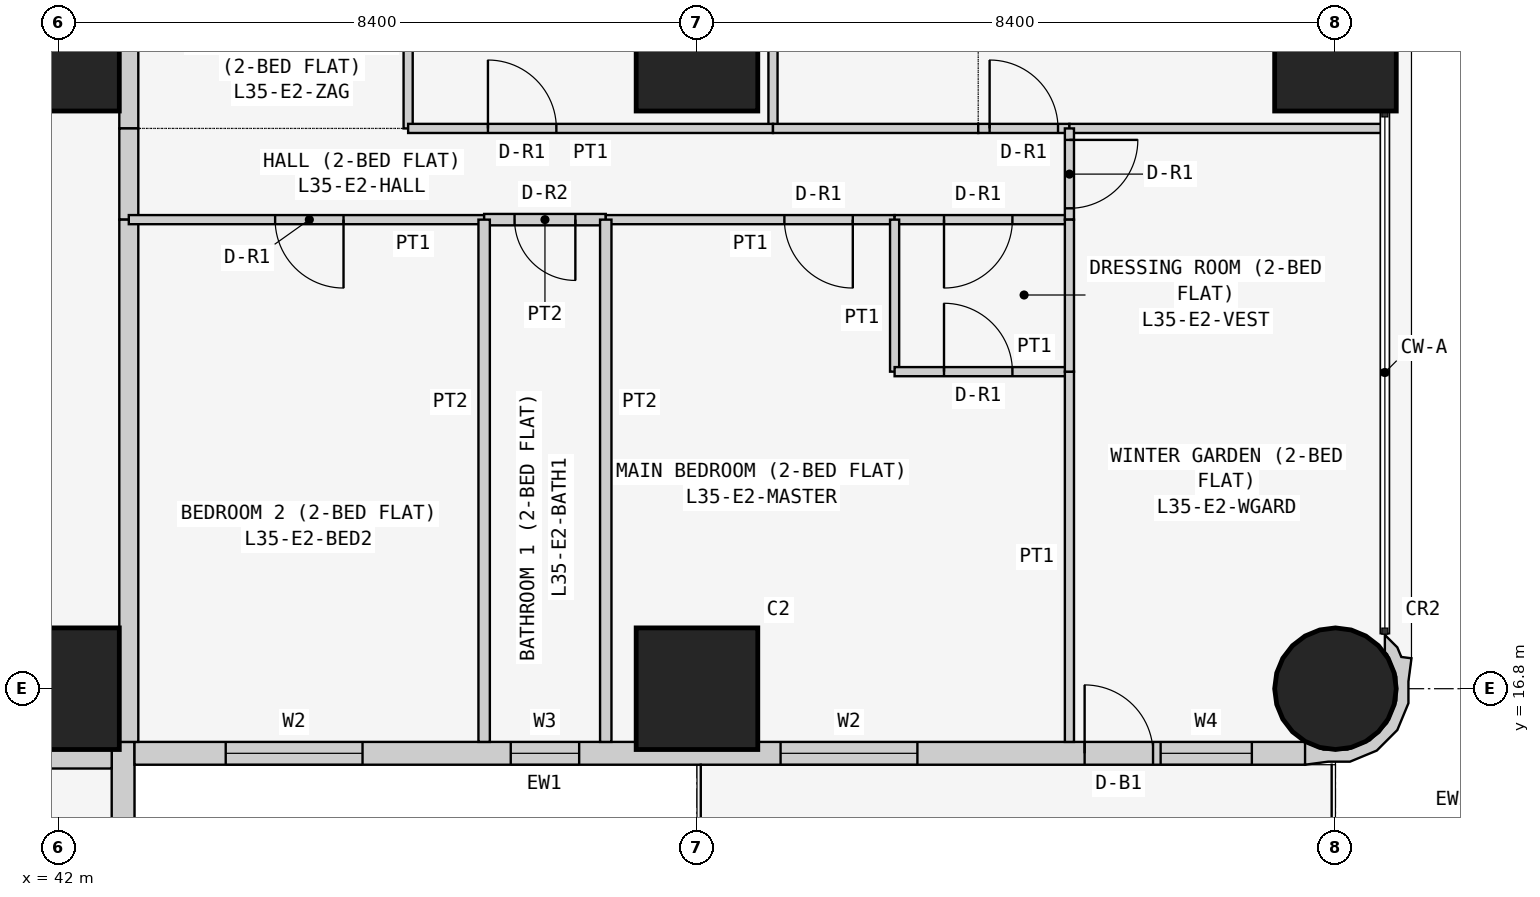
"""IFC4 building model, lengths in metres.
Left out: names, types, materials, properties, quantities, classifications, styles, units other than length and angle.
Written with IfcOpenShell. Run it as: python <this file> out.ifc"""

import sys

from ifc_helpers import new_model, si_unit, direction, frame, frame_2d, origin, origin_2d, place, context, subcontext, project, spatial, polyline, rectangle, circle, outline, extrude, element, fill, save


model = new_model("IFC4")
c1 = context("Model", 3, precision=1e-05, world=origin(), true_north=direction((0.0, 1.0)))
c2 = subcontext(c1, "Body", "Model", "MODEL_VIEW")
j1 = project(units=[si_unit("LENGTHUNIT", "METRE"), si_unit("PLANEANGLEUNIT", "RADIAN")], contexts=[c1])
p1 = place(None, origin())
s1 = spatial("IfcSite", under=j1, at=p1, CompositionType="ELEMENT")
p2 = place(p1, origin())
s2 = spatial("IfcBuilding", under=s1, at=p2, CompositionType="ELEMENT")
p3 = place(p2, frame((0.0, 0.0, 137.7)))
s3 = spatial("IfcBuildingStorey", under=s2, at=p3, CompositionType="ELEMENT", Elevation=137.7)
for number, where, z_axis, x_axis in (
    (1, (42.0, 16.8, 0.0), (0.0, 0.0, 1.0), (1.0, 0.0, 0.0)),
    (2, (42.0, 25.2, 0.0), (0.0, 0.0, 1.0), (1.0, 0.0, 0.0)),
    (3, (50.4, 16.8, 0.0), (0.0, 0.0, 1.0), (1.0, 0.0, 0.0)),
    (4, (50.4, 25.2, 0.0), (0.0, 0.0, 1.0), (1.0, 0.0, 0.0)),
):
    element("IfcColumn", number, at=place(p3, frame(where, z_axis=z_axis, x_axis=x_axis)), inside=s3, PredefinedType="COLUMN", context=c2, shape_type="SweptSolid", body=[
        extrude(rectangle(XDim=1.6, YDim=1.6, at=origin_2d()), origin(), (0.0, 0.0, 1.0), 3.6),
    ])
p4 = place(p3, frame((58.8, 16.8, 0.0), z_axis=(0.0, 0.0, 1.0), x_axis=(1.0, 0.0, 0.0)))
e5 = element("IfcColumn", 5, at=p4, inside=s3, PredefinedType="COLUMN", context=c2, shape_type="SweptSolid", body=[
    extrude(circle(Radius=0.8, at=origin_2d()), origin(), (0.0, 0.0, 1.0), 3.6),
])
p5 = place(p3, frame((58.8, 25.2, 0.0), z_axis=(0.0, 0.0, 1.0), x_axis=(1.0, 0.0, 0.0)))
e6 = element("IfcColumn", 6, at=p5, inside=s3, PredefinedType="COLUMN", context=c2, shape_type="SweptSolid", body=[
    extrude(rectangle(XDim=1.6, YDim=1.6, at=origin_2d()), origin(), (0.0, 0.0, 1.0), 3.6),
])
p6 = place(p3, frame((42.85, 8.8, 0.0), z_axis=(0.0, 0.0, 1.0), x_axis=(0.0, 1.0, 0.0)))
e7 = element("IfcWall", 7, at=p6, inside=s3, PredefinedType="SOLIDWALL", context=c2, shape_type="SweptSolid", body=[
    extrude(rectangle(XDim=7.3, YDim=0.3, at=frame_2d((3.65, 0.0))), origin(), (0.0, 0.0, 1.0), 3.45),
])
p7 = place(p6, frame((3.1, 0.0, 0.9)))
e8 = element("IfcOpeningElement", 8, at=p7, cuts=e7, PredefinedType="OPENING", context=c2, shape_type="SweptSolid", body=[
    extrude(rectangle(XDim=2.4, YDim=1.5, at=frame_2d((1.2, 0.75))), frame((0.0, 0.16, 0.0), z_axis=(0.0, -1.0, 0.0), x_axis=(1.0, 0.0, 0.0)), (0.0, 0.0, 1.0), 0.32),
])
p8 = place(p6, frame((0.75, 0.0, 0.9)))
e9 = element("IfcOpeningElement", 9, at=p8, cuts=e7, PredefinedType="OPENING", context=c2, shape_type="SweptSolid", body=[
    extrude(rectangle(XDim=1.2, YDim=1.5, at=frame_2d((0.6, 0.75))), frame((0.0, 0.16, 0.0), z_axis=(0.0, -1.0, 0.0), x_axis=(1.0, 0.0, 0.0)), (0.0, 0.0, 1.0), 0.32),
])
p9 = place(p3, frame((43.0, 15.95, 0.0), z_axis=(0.0, 0.0, 1.0), x_axis=(1.0, 0.0, 0.0)))
e10 = element("IfcWall", 10, at=p9, inside=s3, PredefinedType="SOLIDWALL", context=c2, shape_type="SweptSolid", body=[
    extrude(rectangle(XDim=15.4, YDim=0.3, at=frame_2d((7.7, 0.0))), origin(), (0.0, 0.0, 1.0), 3.45),
])
p10 = place(p9, frame((1.2, 0.0, 0.9)))
e11 = element("IfcOpeningElement", 11, at=p10, cuts=e10, PredefinedType="OPENING", context=c2, shape_type="SweptSolid", body=[
    extrude(rectangle(XDim=1.8, YDim=1.5, at=frame_2d((0.9, 0.75))), frame((0.0, 0.16, 0.0), z_axis=(0.0, -1.0, 0.0), x_axis=(1.0, 0.0, 0.0)), (0.0, 0.0, 1.0), 0.32),
])
p11 = place(p9, frame((4.95, 0.0, 1.5)))
e12 = element("IfcOpeningElement", 12, at=p11, cuts=e10, PredefinedType="OPENING", context=c2, shape_type="SweptSolid", body=[
    extrude(rectangle(XDim=0.9, YDim=0.7, at=frame_2d((0.45, 0.35))), frame((0.0, 0.16, 0.0), z_axis=(0.0, -1.0, 0.0), x_axis=(1.0, 0.0, 0.0)), (0.0, 0.0, 1.0), 0.32),
])
p12 = place(p9, frame((8.5, 0.0, 0.9)))
e13 = element("IfcOpeningElement", 13, at=p12, cuts=e10, PredefinedType="OPENING", context=c2, shape_type="SweptSolid", body=[
    extrude(rectangle(XDim=1.8, YDim=1.5, at=frame_2d((0.9, 0.75))), frame((0.0, 0.16, 0.0), z_axis=(0.0, -1.0, 0.0), x_axis=(1.0, 0.0, 0.0)), (0.0, 0.0, 1.0), 0.32),
])
p13 = place(p9, frame((12.5, 0.0, 0.0)))
e14 = element("IfcOpeningElement", 14, at=p13, cuts=e10, PredefinedType="OPENING", context=c2, shape_type="SweptSolid", body=[
    extrude(rectangle(XDim=0.9, YDim=2.4, at=frame_2d((0.45, 1.2))), frame((0.0, 0.16, 0.0), z_axis=(0.0, -1.0, 0.0), x_axis=(1.0, 0.0, 0.0)), (0.0, 0.0, 1.0), 0.32),
])
p14 = place(p9, frame((13.5, 0.0, 0.9)))
e15 = element("IfcOpeningElement", 15, at=p14, cuts=e10, PredefinedType="OPENING", context=c2, shape_type="SweptSolid", body=[
    extrude(rectangle(XDim=1.2, YDim=1.5, at=frame_2d((0.6, 0.75))), frame((0.0, 0.16, 0.0), z_axis=(0.0, -1.0, 0.0), x_axis=(1.0, 0.0, 0.0)), (0.0, 0.0, 1.0), 0.32),
])
p15 = place(p3, frame((58.473, 15.983, 0.0), z_axis=(0.0, 0.0, 1.0), x_axis=(0.93923434088, -0.343276641956, 0.0)))
e16 = element("IfcWall", 16, at=p15, inside=s3, PredefinedType="SOLIDWALL", context=c2, shape_type="SweptSolid", body=[
    extrude(outline(polyline([(0.828, 1.599), (0.697, 1.569), (0.604, 1.67), (0.394, 1.767), (0.471, 1.556), (0.508, 1.539), (0.724, 1.304), (0.834, 1.005), (0.82, 0.686), (0.686, 0.397), (0.451, 0.182), (0.152, 0.073), (-0.116, 0.084), (-0.127, 0.078), (-0.146, 0.071), (-0.006, -0.197), (0.266, -0.055), (0.535, 0.044), (0.817, 0.302), (0.978, 0.648), (0.994, 1.03), (0.895, 1.3), (0.828, 1.599)])), origin(), (0.0, 0.0, 1.0), 3.45),
])
p16 = place(p3, frame((42.925, 29.4, 0.0), z_axis=(0.0, 0.0, 1.0), x_axis=(0.0, -1.0, 0.0)))
e17 = element("IfcWall", 17, at=p16, inside=s3, PredefinedType="PARTITIONING", context=c2, shape_type="SweptSolid", body=[
    extrude(rectangle(XDim=5.229, YDim=0.25, at=frame_2d((2.615, 0.0))), origin(), (0.0, 0.0, 1.0), 3.45),
])
p17 = place(p16, frame((2.1, 0.0, 0.0)))
e18 = element("IfcOpeningElement", 18, at=p17, cuts=e17, PredefinedType="OPENING", context=c2, shape_type="SweptSolid", body=[
    extrude(rectangle(XDim=1.0, YDim=2.1, at=frame_2d((0.5, 1.05))), frame((0.0, 0.135, 0.0), z_axis=(0.0, -1.0, 0.0), x_axis=(1.0, 0.0, 0.0)), (0.0, 0.0, 1.0), 0.27),
])
p18 = place(p3, frame((42.925, 24.171, 0.0), z_axis=(0.0, 0.0, 1.0), x_axis=(0.0, -1.0, 0.0)))
e19 = element("IfcWall", 19, at=p18, inside=s3, PredefinedType="PARTITIONING", context=c2, shape_type="SweptSolid", body=[
    extrude(rectangle(XDim=1.2, YDim=0.25, at=frame_2d((0.6, 0.0))), origin(), (0.0, 0.0, 1.0), 3.45),
])
for number, where, z_axis, x_axis in (
    (20, (42.925, 22.971, 0.0), (0.0, 0.0, 1.0), (0.0, -1.0, 0.0)),
    (21, (42.7, 15.875, 0.0), (0.0, 0.0, 1.0), (-1.0, 0.0, 0.0)),
):
    element("IfcWall", number, at=place(p3, frame(where, z_axis=z_axis, x_axis=x_axis)), inside=s3, PredefinedType="PARTITIONING", context=c2, shape_type="SweptSolid", body=[
        extrude(rectangle(XDim=6.871, YDim=0.25, at=frame_2d((3.436, 0.0))), origin(), (0.0, 0.0, 1.0), 3.45),
    ])
for number, where, z_axis, x_axis in (
    (22, (46.6, 29.4, 0.0), (0.0, 0.0, 1.0), (0.0, -1.0, 0.0)),
    (23, (51.4, 29.4, 0.0), (0.0, 0.0, 1.0), (0.0, -1.0, 0.0)),
):
    element("IfcWall", number, at=place(p3, frame(where, z_axis=z_axis, x_axis=x_axis)), inside=s3, PredefinedType="PARTITIONING", context=c2, shape_type="SweptSolid", body=[
        extrude(rectangle(XDim=5.229, YDim=0.12, at=frame_2d((2.615, 0.0))), origin(), (0.0, 0.0, 1.0), 3.45),
    ])
p19 = place(p3, frame((51.4, 24.171, 0.0), z_axis=(0.0, 0.0, 1.0), x_axis=(-1.0, 0.0, 0.0)))
e24 = element("IfcWall", 24, at=p19, inside=s3, PredefinedType="PARTITIONING", context=c2, shape_type="SweptSolid", body=[
    extrude(rectangle(XDim=4.8, YDim=0.12, at=frame_2d((2.4, 0.0))), origin(), (0.0, 0.0, 1.0), 3.45),
])
p20 = place(p19, frame((2.85, 0.0, 0.0)))
e25 = element("IfcOpeningElement", 25, at=p20, cuts=e24, PredefinedType="OPENING", context=c2, shape_type="SweptSolid", body=[
    extrude(rectangle(XDim=0.9, YDim=2.1, at=frame_2d((0.45, 1.05))), frame((0.0, 0.07, 0.0), z_axis=(0.0, -1.0, 0.0), x_axis=(1.0, 0.0, 0.0)), (0.0, 0.0, 1.0), 0.14),
])
p21 = place(p3, frame((54.1, 24.171, 0.0), z_axis=(0.0, 0.0, 1.0), x_axis=(-1.0, 0.0, 0.0)))
e26 = element("IfcWall", 26, at=p21, inside=s3, PredefinedType="PARTITIONING", context=c2, shape_type="SweptSolid", body=[
    extrude(rectangle(XDim=2.7, YDim=0.12, at=frame_2d((1.35, 0.0))), origin(), (0.0, 0.0, 1.0), 3.45),
])
p22 = place(p3, frame((55.3, 24.171, 0.0), z_axis=(0.0, 0.0, 1.0), x_axis=(-1.0, 0.0, 0.0)))
e27 = element("IfcWall", 27, at=p22, inside=s3, PredefinedType="PARTITIONING", context=c2, shape_type="SweptSolid", body=[
    extrude(rectangle(XDim=1.2, YDim=0.12, at=frame_2d((0.6, 0.0))), origin(), (0.0, 0.0, 1.0), 3.45),
])
p23 = place(p22, frame((0.15, 0.0, 0.0)))
e28 = element("IfcOpeningElement", 28, at=p23, cuts=e27, PredefinedType="OPENING", context=c2, shape_type="SweptSolid", body=[
    extrude(rectangle(XDim=0.9, YDim=2.1, at=frame_2d((0.45, 1.05))), frame((0.0, 0.07, 0.0), z_axis=(0.0, -1.0, 0.0), x_axis=(1.0, 0.0, 0.0)), (0.0, 0.0, 1.0), 0.14),
])
p24 = place(p3, frame((59.45, 24.171, 0.0), z_axis=(0.0, 0.0, 1.0), x_axis=(-1.0, 0.0, 0.0)))
e29 = element("IfcWall", 29, at=p24, inside=s3, PredefinedType="PARTITIONING", context=c2, shape_type="SweptSolid", body=[
    extrude(rectangle(XDim=4.15, YDim=0.12, at=frame_2d((2.075, 0.0))), origin(), (0.0, 0.0, 1.0), 3.45),
])
p25 = place(p3, frame((47.6, 22.971, 0.0), z_axis=(0.0, 0.0, 1.0), x_axis=(-1.0, 0.0, 0.0)))
e30 = element("IfcWall", 30, at=p25, inside=s3, PredefinedType="PARTITIONING", context=c2, shape_type="SweptSolid", body=[
    extrude(rectangle(XDim=4.675, YDim=0.12, at=frame_2d((2.337, 0.0))), origin(), (0.0, 0.0, 1.0), 3.45),
])
p26 = place(p25, frame((1.85, 0.0, 0.0)))
e31 = element("IfcOpeningElement", 31, at=p26, cuts=e30, PredefinedType="OPENING", context=c2, shape_type="SweptSolid", body=[
    extrude(rectangle(XDim=0.9, YDim=2.1, at=frame_2d((0.45, 1.05))), frame((0.0, 0.07, 0.0), z_axis=(0.0, -1.0, 0.0), x_axis=(1.0, 0.0, 0.0)), (0.0, 0.0, 1.0), 0.14),
])
p27 = place(p3, frame((49.2, 22.971, 0.0), z_axis=(0.0, 0.0, 1.0), x_axis=(-1.0, 0.0, 0.0)))
e32 = element("IfcWall", 32, at=p27, inside=s3, PredefinedType="PARTITIONING", context=c2, shape_type="SweptSolid", body=[
    extrude(rectangle(XDim=1.6, YDim=0.15, at=frame_2d((0.8, 0.0))), origin(), (0.0, 0.0, 1.0), 3.45),
])
p28 = place(p27, frame((0.4, 0.0, 0.0)))
e33 = element("IfcOpeningElement", 33, at=p28, cuts=e32, PredefinedType="OPENING", context=c2, shape_type="SweptSolid", body=[
    extrude(rectangle(XDim=0.8, YDim=2.1, at=frame_2d((0.4, 1.05))), frame((0.0, 0.085, 0.0), z_axis=(0.0, -1.0, 0.0), x_axis=(1.0, 0.0, 0.0)), (0.0, 0.0, 1.0), 0.17),
])
p29 = place(p3, frame((53.0, 22.971, 0.0), z_axis=(0.0, 0.0, 1.0), x_axis=(-1.0, 0.0, 0.0)))
e34 = element("IfcWall", 34, at=p29, inside=s3, PredefinedType="PARTITIONING", context=c2, shape_type="SweptSolid", body=[
    extrude(rectangle(XDim=3.8, YDim=0.12, at=frame_2d((1.9, 0.0))), origin(), (0.0, 0.0, 1.0), 3.45),
])
p30 = place(p29, frame((0.55, 0.0, 0.0)))
e35 = element("IfcOpeningElement", 35, at=p30, cuts=e34, PredefinedType="OPENING", context=c2, shape_type="SweptSolid", body=[
    extrude(rectangle(XDim=0.9, YDim=2.1, at=frame_2d((0.45, 1.05))), frame((0.0, 0.07, 0.0), z_axis=(0.0, -1.0, 0.0), x_axis=(1.0, 0.0, 0.0)), (0.0, 0.0, 1.0), 0.14),
])
p31 = place(p3, frame((55.3, 22.971, 0.0), z_axis=(0.0, 0.0, 1.0), x_axis=(-1.0, 0.0, 0.0)))
e36 = element("IfcWall", 36, at=p31, inside=s3, PredefinedType="PARTITIONING", context=c2, shape_type="SweptSolid", body=[
    extrude(rectangle(XDim=2.3, YDim=0.12, at=frame_2d((1.15, 0.0))), origin(), (0.0, 0.0, 1.0), 3.45),
])
p32 = place(p31, frame((0.75, 0.0, 0.0)))
e37 = element("IfcOpeningElement", 37, at=p32, cuts=e36, PredefinedType="OPENING", context=c2, shape_type="SweptSolid", body=[
    extrude(rectangle(XDim=0.9, YDim=2.1, at=frame_2d((0.45, 1.05))), frame((0.0, 0.07, 0.0), z_axis=(0.0, -1.0, 0.0), x_axis=(1.0, 0.0, 0.0)), (0.0, 0.0, 1.0), 0.14),
])
p33 = place(p3, frame((55.3, 24.171, 0.0), z_axis=(0.0, 0.0, 1.0), x_axis=(0.0, -1.0, 0.0)))
e38 = element("IfcWall", 38, at=p33, inside=s3, PredefinedType="PARTITIONING", context=c2, shape_type="SweptSolid", body=[
    extrude(rectangle(XDim=1.2, YDim=0.12, at=frame_2d((0.6, 0.0))), origin(), (0.0, 0.0, 1.0), 3.45),
])
p34 = place(p33, frame((0.151, 0.0, 0.0)))
e39 = element("IfcOpeningElement", 39, at=p34, cuts=e38, PredefinedType="OPENING", context=c2, shape_type="SweptSolid", body=[
    extrude(rectangle(XDim=0.9, YDim=2.1, at=frame_2d((0.45, 1.05))), frame((0.0, 0.07, 0.0), z_axis=(0.0, -1.0, 0.0), x_axis=(1.0, 0.0, 0.0)), (0.0, 0.0, 1.0), 0.14),
])
for number, where, z_axis, x_axis in (
    (40, (47.6, 22.971, 0.0), (0.0, 0.0, 1.0), (0.0, -1.0, 0.0)),
    (41, (49.2, 22.971, 0.0), (0.0, 0.0, 1.0), (0.0, -1.0, 0.0)),
):
    element("IfcWall", number, at=place(p3, frame(where, z_axis=z_axis, x_axis=x_axis)), inside=s3, PredefinedType="PARTITIONING", context=c2, shape_type="SweptSolid", body=[
        extrude(rectangle(XDim=6.871, YDim=0.15, at=frame_2d((3.436, 0.0))), origin(), (0.0, 0.0, 1.0), 3.45),
    ])
p35 = place(p3, frame((53.0, 22.971, 0.0), z_axis=(0.0, 0.0, 1.0), x_axis=(0.0, -1.0, 0.0)))
e42 = element("IfcWall", 42, at=p35, inside=s3, PredefinedType="PARTITIONING", context=c2, shape_type="SweptSolid", body=[
    extrude(rectangle(XDim=2.0, YDim=0.12, at=frame_2d((1.0, 0.0))), origin(), (0.0, 0.0, 1.0), 3.45),
])
p36 = place(p3, frame((53.0, 20.971, 0.0), z_axis=(0.0, 0.0, 1.0), x_axis=(1.0, 0.0, 0.0)))
e43 = element("IfcWall", 43, at=p36, inside=s3, PredefinedType="PARTITIONING", context=c2, shape_type="SweptSolid", body=[
    extrude(rectangle(XDim=2.3, YDim=0.12, at=frame_2d((1.15, 0.0))), origin(), (0.0, 0.0, 1.0), 3.45),
])
p37 = place(p36, frame((0.65, 0.0, 0.0)))
e44 = element("IfcOpeningElement", 44, at=p37, cuts=e43, PredefinedType="OPENING", context=c2, shape_type="SweptSolid", body=[
    extrude(rectangle(XDim=0.9, YDim=2.1, at=frame_2d((0.45, 1.05))), frame((0.0, 0.07, 0.0), z_axis=(0.0, -1.0, 0.0), x_axis=(1.0, 0.0, 0.0)), (0.0, 0.0, 1.0), 0.14),
])
p38 = place(p3, frame((55.3, 20.971, 0.0), z_axis=(0.0, 0.0, 1.0), x_axis=(0.0, -1.0, 0.0)))
e45 = element("IfcWall", 45, at=p38, inside=s3, PredefinedType="PARTITIONING", context=c2, shape_type="SweptSolid", body=[
    extrude(rectangle(XDim=4.871, YDim=0.12, at=frame_2d((2.436, 0.0))), origin(), (0.0, 0.0, 1.0), 3.45),
])
p39 = place(p3, frame((55.3, 22.971, 0.0), z_axis=(0.0, 0.0, 1.0), x_axis=(0.0, -1.0, 0.0)))
e46 = element("IfcWall", 46, at=p39, inside=s3, PredefinedType="PARTITIONING", context=c2, shape_type="SweptSolid", body=[
    extrude(rectangle(XDim=2.0, YDim=0.12, at=frame_2d((1.0, 0.0))), origin(), (0.0, 0.0, 1.0), 3.45),
])
p40 = place(p10, origin())
e47 = element("IfcWindow", 47, at=p40, inside=s3, PartitioningType="SINGLE_PANEL", PredefinedType="WINDOW", context=c2, shape_type="SweptSolid", body=[
    extrude(rectangle(XDim=1.8, YDim=1.5, at=frame_2d((0.9, 0.75))), frame((0.0, 0.03, 0.0), z_axis=(0.0, -1.0, 0.0), x_axis=(1.0, 0.0, 0.0)), (0.0, 0.0, 1.0), 0.06),
])
fill(e11, e47)
p41 = place(p11, origin())
e48 = element("IfcWindow", 48, at=p41, inside=s3, PartitioningType="SINGLE_PANEL", PredefinedType="WINDOW", context=c2, shape_type="SweptSolid", body=[
    extrude(rectangle(XDim=0.9, YDim=0.7, at=frame_2d((0.45, 0.35))), frame((0.0, 0.03, 0.0), z_axis=(0.0, -1.0, 0.0), x_axis=(1.0, 0.0, 0.0)), (0.0, 0.0, 1.0), 0.06),
])
fill(e12, e48)
p42 = place(p12, origin())
e49 = element("IfcWindow", 49, at=p42, inside=s3, PartitioningType="SINGLE_PANEL", PredefinedType="WINDOW", context=c2, shape_type="SweptSolid", body=[
    extrude(rectangle(XDim=1.8, YDim=1.5, at=frame_2d((0.9, 0.75))), frame((0.0, 0.03, 0.0), z_axis=(0.0, -1.0, 0.0), x_axis=(1.0, 0.0, 0.0)), (0.0, 0.0, 1.0), 0.06),
])
fill(e13, e49)
p43 = place(p13, origin())
e50 = element("IfcDoor", 50, at=p43, inside=s3, OperationType="SINGLE_SWING_LEFT", PredefinedType="DOOR", context=c2, shape_type="SweptSolid", body=[
    extrude(rectangle(XDim=0.9, YDim=2.4, at=frame_2d((0.45, 1.2))), frame((0.0, 0.025, 0.0), z_axis=(0.0, -1.0, 0.0), x_axis=(1.0, 0.0, 0.0)), (0.0, 0.0, 1.0), 0.05),
])
fill(e14, e50)
p44 = place(p14, origin())
e51 = element("IfcWindow", 51, at=p44, inside=s3, PartitioningType="SINGLE_PANEL", PredefinedType="WINDOW", context=c2, shape_type="SweptSolid", body=[
    extrude(rectangle(XDim=1.2, YDim=1.5, at=frame_2d((0.6, 0.75))), frame((0.0, 0.03, 0.0), z_axis=(0.0, -1.0, 0.0), x_axis=(1.0, 0.0, 0.0)), (0.0, 0.0, 1.0), 0.06),
])
fill(e15, e51)
p45 = place(p20, frame((0.9, 0.0, 0.0), z_axis=(0.0, 0.0, 1.0), x_axis=(-1.0, 0.0, 0.0)))
e52 = element("IfcDoor", 52, at=p45, inside=s3, OperationType="SINGLE_SWING_LEFT", PredefinedType="DOOR", context=c2, shape_type="SweptSolid", body=[
    extrude(rectangle(XDim=0.9, YDim=2.1, at=frame_2d((0.45, 1.05))), frame((0.0, 0.025, 0.0), z_axis=(0.0, -1.0, 0.0), x_axis=(1.0, 0.0, 0.0)), (0.0, 0.0, 1.0), 0.05),
])
fill(e25, e52)
p46 = place(p23, frame((0.9, 0.0, 0.0), z_axis=(0.0, 0.0, 1.0), x_axis=(-1.0, 0.0, 0.0)))
e53 = element("IfcDoor", 53, at=p46, inside=s3, OperationType="SINGLE_SWING_LEFT", PredefinedType="DOOR", context=c2, shape_type="SweptSolid", body=[
    extrude(rectangle(XDim=0.9, YDim=2.1, at=frame_2d((0.45, 1.05))), frame((0.0, 0.025, 0.0), z_axis=(0.0, -1.0, 0.0), x_axis=(1.0, 0.0, 0.0)), (0.0, 0.0, 1.0), 0.05),
])
fill(e28, e53)
p47 = place(p26, origin())
e54 = element("IfcDoor", 54, at=p47, inside=s3, OperationType="SINGLE_SWING_LEFT", PredefinedType="DOOR", context=c2, shape_type="SweptSolid", body=[
    extrude(rectangle(XDim=0.9, YDim=2.1, at=frame_2d((0.45, 1.05))), frame((0.0, 0.025, 0.0), z_axis=(0.0, -1.0, 0.0), x_axis=(1.0, 0.0, 0.0)), (0.0, 0.0, 1.0), 0.05),
])
fill(e31, e54)
p48 = place(p28, origin())
e55 = element("IfcDoor", 55, at=p48, inside=s3, OperationType="SINGLE_SWING_LEFT", PredefinedType="DOOR", context=c2, shape_type="SweptSolid", body=[
    extrude(rectangle(XDim=0.8, YDim=2.1, at=frame_2d((0.4, 1.05))), frame((0.0, 0.025, 0.0), z_axis=(0.0, -1.0, 0.0), x_axis=(1.0, 0.0, 0.0)), (0.0, 0.0, 1.0), 0.05),
])
fill(e33, e55)
p49 = place(p30, origin())
e56 = element("IfcDoor", 56, at=p49, inside=s3, OperationType="SINGLE_SWING_LEFT", PredefinedType="DOOR", context=c2, shape_type="SweptSolid", body=[
    extrude(rectangle(XDim=0.9, YDim=2.1, at=frame_2d((0.45, 1.05))), frame((0.0, 0.025, 0.0), z_axis=(0.0, -1.0, 0.0), x_axis=(1.0, 0.0, 0.0)), (0.0, 0.0, 1.0), 0.05),
])
fill(e35, e56)
p50 = place(p32, origin())
e57 = element("IfcDoor", 57, at=p50, inside=s3, OperationType="SINGLE_SWING_RIGHT", PredefinedType="DOOR", context=c2, shape_type="SweptSolid", body=[
    extrude(rectangle(XDim=0.9, YDim=2.1, at=frame_2d((0.45, 1.05))), frame((0.0, 0.025, 0.0), z_axis=(0.0, -1.0, 0.0), x_axis=(1.0, 0.0, 0.0)), (0.0, 0.0, 1.0), 0.05),
])
fill(e37, e57)
p51 = place(p37, origin())
e58 = element("IfcDoor", 58, at=p51, inside=s3, OperationType="SINGLE_SWING_LEFT", PredefinedType="DOOR", context=c2, shape_type="SweptSolid", body=[
    extrude(rectangle(XDim=0.9, YDim=2.1, at=frame_2d((0.45, 1.05))), frame((0.0, 0.025, 0.0), z_axis=(0.0, -1.0, 0.0), x_axis=(1.0, 0.0, 0.0)), (0.0, 0.0, 1.0), 0.05),
])
fill(e44, e58)
p52 = place(p34, origin())
e59 = element("IfcDoor", 59, at=p52, inside=s3, OperationType="SINGLE_SWING_LEFT", PredefinedType="DOOR", context=c2, shape_type="SweptSolid", body=[
    extrude(rectangle(XDim=0.9, YDim=2.1, at=frame_2d((0.45, 1.05))), frame((0.0, 0.025, 0.0), z_axis=(0.0, -1.0, 0.0), x_axis=(1.0, 0.0, 0.0)), (0.0, 0.0, 1.0), 0.05),
])
fill(e39, e59)
save(model, sys.argv[1])
